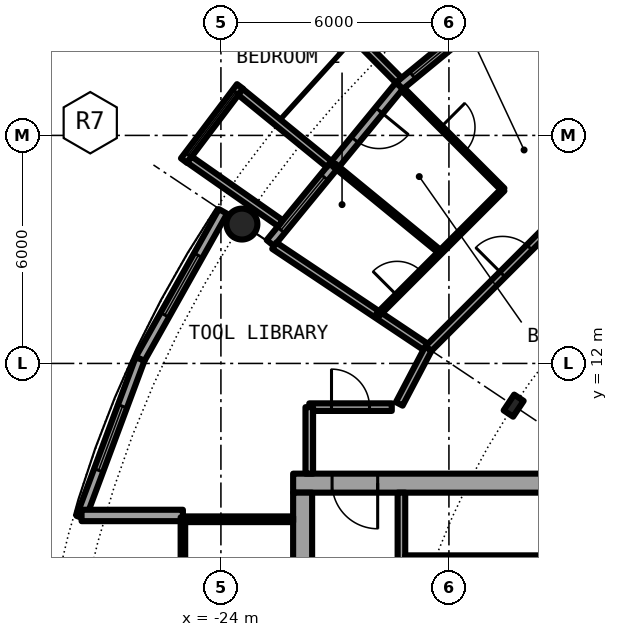
"""IFC4 building model, lengths in metres.
Left out: names, types, materials, properties, quantities, classifications, styles, units other than length and angle.
Written with IfcOpenShell. Run it as: python <this file> out.ifc"""

import sys

from ifc_helpers import new_model, si_unit, direction, frame, frame_2d, origin, origin_2d, place, context, subcontext, project, spatial, rectangle, circle, hollow_circle, i_section, extrude, element, fill, save


model = new_model("IFC4")
c1 = context("Model", 3, precision=1e-05, world=origin(), true_north=direction((0.0, 1.0)))
c2 = subcontext(c1, "Body", "Model", "MODEL_VIEW")
j1 = project(units=[si_unit("LENGTHUNIT", "METRE"), si_unit("PLANEANGLEUNIT", "RADIAN")], contexts=[c1])
p1 = place(None, origin())
s1 = spatial("IfcSite", under=j1, at=p1, CompositionType="ELEMENT")
p2 = place(p1, origin())
s2 = spatial("IfcBuilding", under=s1, at=p2, CompositionType="ELEMENT")
p3 = place(p2, frame((0.0, 0.0, 170.75)))
s3 = spatial("IfcBuildingStorey", under=s2, at=p3, CompositionType="ELEMENT", Elevation=170.75)
p4 = place(p3, frame((-23.448, 15.667, 0.0), z_axis=(0.0, 0.0, 1.0), x_axis=(1.0, 0.0, 0.0)))
e1 = element("IfcColumn", 1, at=p4, inside=s3, PredefinedType="COLUMN", context=c2, shape_type="SweptSolid", body=[
    extrude(hollow_circle(Radius=0.406, WallThickness=0.04, at=origin_2d()), origin(), (0.0, 0.0, 1.0), 3.05),
])
p5 = place(p3, frame((-16.297, 10.889, 0.0), z_axis=(0.0, 0.0, 1.0), x_axis=(-0.831469612303, 0.55557023302, 0.0)))
e2 = element("IfcColumn", 2, at=p5, inside=s3, PredefinedType="COLUMN", context=c2, shape_type="SweptSolid", body=[
    extrude(i_section(OverallWidth=0.3, OverallDepth=0.5, WebThickness=0.014, FlangeThickness=0.028, FilletRadius=0.027, at=origin_2d()), origin(), (0.0, 0.0, 1.0), 3.05),
])
p6 = place(p3, frame((-15.167, 22.699, 0.0), z_axis=(0.0, 0.0, 1.0), x_axis=(-0.773019449054, -0.634382322723, 0.0)))
e3 = element("IfcWall", 3, at=p6, inside=s3, PredefinedType="SOLIDWALL", context=c2, shape_type="SweptSolid", body=[
    extrude(rectangle(XDim=5.352, YDim=0.25, at=frame_2d((2.676, 0.0))), origin(), (0.0, 0.0, 1.0), 2.7),
])
p7 = place(p6, frame((0.841, 0.0, 0.0)))
e4 = element("IfcOpeningElement", 4, at=p7, cuts=e3, PredefinedType="OPENING", context=c2, shape_type="SweptSolid", body=[
    extrude(rectangle(XDim=1.0, YDim=2.2, at=frame_2d((0.5, 1.1))), frame((0.0, 0.135, 0.0), z_axis=(0.0, -1.0, 0.0), x_axis=(1.0, 0.0, 0.0)), (0.0, 0.0, 1.0), 0.27),
])
p8 = place(p6, frame((3.111, 0.0, 0.3)))
e5 = element("IfcOpeningElement", 5, at=p8, cuts=e3, PredefinedType="OPENING", context=c2, shape_type="SweptSolid", body=[
    extrude(rectangle(XDim=1.8, YDim=2.1, at=frame_2d((0.9, 1.05))), frame((0.0, 0.135, 0.0), z_axis=(0.0, -1.0, 0.0), x_axis=(1.0, 0.0, 0.0)), (0.0, 0.0, 1.0), 0.27),
])
p9 = place(p3, frame((-19.323, 19.45, -0.03), z_axis=(0.0, 0.0, 1.0), x_axis=(-0.704476739375, 0.709727076896, 0.0)))
e6 = element("IfcWall", 6, at=p9, inside=s3, PredefinedType="SOLIDWALL", context=c2, shape_type="SweptSolid", body=[
    extrude(rectangle(XDim=2.883, YDim=0.2, at=frame_2d((1.441, 0.0))), origin(), (0.0, 0.0, 1.0), 2.73),
])
p10 = place(p3, frame((-19.304, 19.304, 0.0), z_axis=(0.0, 0.0, 1.0), x_axis=(-0.634382322723, -0.773019449054, 0.0)))
e7 = element("IfcWall", 7, at=p10, inside=s3, PredefinedType="SOLIDWALL", context=c2, shape_type="SweptSolid", body=[
    extrude(rectangle(XDim=5.352, YDim=0.25, at=frame_2d((2.676, 0.0))), origin(), (0.0, 0.0, 1.0), 2.7),
])
p11 = place(p10, frame((0.841, 0.0, 0.0)))
e8 = element("IfcOpeningElement", 8, at=p11, cuts=e7, PredefinedType="OPENING", context=c2, shape_type="SweptSolid", body=[
    extrude(rectangle(XDim=1.0, YDim=2.2, at=frame_2d((0.5, 1.1))), frame((0.0, 0.135, 0.0), z_axis=(0.0, -1.0, 0.0), x_axis=(1.0, 0.0, 0.0)), (0.0, 0.0, 1.0), 0.27),
])
p12 = place(p10, frame((3.111, 0.0, 0.3)))
e9 = element("IfcOpeningElement", 9, at=p12, cuts=e7, PredefinedType="OPENING", context=c2, shape_type="SweptSolid", body=[
    extrude(rectangle(XDim=1.8, YDim=2.1, at=frame_2d((0.9, 1.05))), frame((0.0, 0.135, 0.0), z_axis=(0.0, -1.0, 0.0), x_axis=(1.0, 0.0, 0.0)), (0.0, 0.0, 1.0), 0.27),
])
p13 = place(p3, frame((-23.497, 19.289, -0.03), z_axis=(0.0, 0.0, 1.0), x_axis=(-0.602806268067, -0.797887588059, 0.0)))
e10 = element("IfcWall", 10, at=p13, inside=s3, PredefinedType="SOLIDWALL", context=c2, shape_type="SweptSolid", body=[
    extrude(rectangle(XDim=2.447, YDim=0.2, at=frame_2d((1.223, 0.0))), origin(), (0.0, 0.0, 1.0), 2.73),
])
p14 = place(p13, frame((0.183, 0.0, 0.33)))
e11 = element("IfcOpeningElement", 11, at=p14, cuts=e10, PredefinedType="OPENING", context=c2, shape_type="SweptSolid", body=[
    extrude(circle(Radius=1.04, at=frame_2d((1.04, 1.04))), frame((0.0, 0.11, 0.0), z_axis=(0.0, -1.0, 0.0), x_axis=(1.0, 0.0, 0.0)), (0.0, 0.0, 1.0), 0.22),
])
p15 = place(p3, frame((-21.155, 17.246, -0.03), z_axis=(0.0, 0.0, 1.0), x_axis=(-0.775179004516, 0.631741648902, 0.0)))
e12 = element("IfcWall", 12, at=p15, inside=s3, PredefinedType="SOLIDWALL", context=c2, shape_type="SweptSolid", body=[
    extrude(rectangle(XDim=3.006, YDim=0.2, at=frame_2d((1.503, 0.0))), origin(), (0.0, 0.0, 1.0), 2.73),
])
p16 = place(p3, frame((-22.433, 15.688, -0.03), z_axis=(0.0, 0.0, 1.0), x_axis=(-0.819373043115, 0.573260687834, 0.0)))
e13 = element("IfcWall", 13, at=p16, inside=s3, PredefinedType="SOLIDWALL", context=c2, shape_type="SweptSolid", body=[
    extrude(rectangle(XDim=2.925, YDim=0.2, at=frame_2d((1.463, 0.0))), origin(), (0.0, 0.0, 1.0), 2.73),
])
p17 = place(p3, frame((-23.946, 16.0, 0.0), z_axis=(0.0, 0.0, 1.0), x_axis=(-0.489696356642, -0.871893042919, 0.0)))
e14 = element("IfcWall", 14, at=p17, inside=s3, PredefinedType="SOLIDWALL", context=c2, shape_type="SweptSolid", body=[
    extrude(rectangle(XDim=4.454, YDim=0.25, at=frame_2d((2.227, 0.0))), origin(), (0.0, 0.0, 1.0), 2.7),
])
p18 = place(p17, frame((1.327, 0.0, 0.3)))
e15 = element("IfcOpeningElement", 15, at=p18, cuts=e14, PredefinedType="OPENING", context=c2, shape_type="SweptSolid", body=[
    extrude(rectangle(XDim=1.8, YDim=2.1, at=frame_2d((0.9, 1.05))), frame((0.0, 0.135, 0.0), z_axis=(0.0, -1.0, 0.0), x_axis=(1.0, 0.0, 0.0)), (0.0, 0.0, 1.0), 0.27),
])
p19 = place(p3, frame((-26.127, 12.117, 0.0), z_axis=(0.0, 0.0, 1.0), x_axis=(-0.349247811493, -0.937030397675, 0.0)))
e16 = element("IfcWall", 16, at=p19, inside=s3, PredefinedType="SOLIDWALL", context=c2, shape_type="SweptSolid", body=[
    extrude(rectangle(XDim=4.452, YDim=0.25, at=frame_2d((2.226, 0.0))), origin(), (0.0, 0.0, 1.0), 2.7),
])
p20 = place(p19, frame((1.327, 0.0, 0.3)))
e17 = element("IfcOpeningElement", 17, at=p20, cuts=e16, PredefinedType="OPENING", context=c2, shape_type="SweptSolid", body=[
    extrude(rectangle(XDim=1.8, YDim=2.1, at=frame_2d((0.9, 1.05))), frame((0.0, 0.135, 0.0), z_axis=(0.0, -1.0, 0.0), x_axis=(1.0, 0.0, 0.0)), (0.0, 0.0, 1.0), 0.27),
])
p21 = place(p3, frame((-25.0, 8.0, 0.0), z_axis=(0.0, 0.0, 1.0), x_axis=(-1.0, 0.0, 0.0)))
e18 = element("IfcWall", 18, at=p21, inside=s3, PredefinedType="SOLIDWALL", context=c2, shape_type="SweptSolid", body=[
    extrude(rectangle(XDim=2.667, YDim=0.3, at=frame_2d((1.333, 0.0))), origin(), (0.0, 0.0, 1.0), 2.7),
])
p22 = place(p3, frame((-8.5, 8.85, 0.0), z_axis=(0.0, 0.0, 1.0), x_axis=(-1.0, 0.0, 0.0)))
e19 = element("IfcWall", 19, at=p22, inside=s3, PredefinedType="SHEAR", context=c2, shape_type="SweptSolid", body=[
    extrude(rectangle(XDim=13.6, YDim=0.5, at=frame_2d((6.8, 0.0))), origin(), (0.0, 0.0, 1.0), 3.05),
])
p23 = place(p22, frame((11.375, 0.0, 0.0)))
e20 = element("IfcOpeningElement", 20, at=p23, cuts=e19, PredefinedType="OPENING", context=c2, shape_type="SweptSolid", body=[
    extrude(rectangle(XDim=1.2, YDim=2.3, at=frame_2d((0.6, 1.15))), frame((0.0, 0.26, 0.0), z_axis=(0.0, -1.0, 0.0), x_axis=(1.0, 0.0, 0.0)), (0.0, 0.0, 1.0), 0.52),
])
p24 = place(p3, frame((-21.85, -8.6, 0.0), z_axis=(0.0, 0.0, 1.0), x_axis=(0.0, 1.0, 0.0)))
e21 = element("IfcWall", 21, at=p24, inside=s3, PredefinedType="SHEAR", context=c2, shape_type="SweptSolid", body=[
    extrude(rectangle(XDim=17.2, YDim=0.5, at=frame_2d((8.6, 0.0))), origin(), (0.0, 0.0, 1.0), 3.05),
])
p25 = place(p24, frame((7.7, 0.0, 0.0)))
e22 = element("IfcOpeningElement", 22, at=p25, cuts=e21, PredefinedType="OPENING", context=c2, shape_type="SweptSolid", body=[
    extrude(rectangle(XDim=1.8, YDim=2.3, at=frame_2d((0.9, 1.15))), frame((0.0, 0.26, 0.0), z_axis=(0.0, -1.0, 0.0), x_axis=(1.0, 0.0, 0.0)), (0.0, 0.0, 1.0), 0.52),
])
p26 = place(p3, frame((-19.25, 8.6, 0.0), z_axis=(0.0, 0.0, 1.0), x_axis=(0.0, -1.0, 0.0)))
e23 = element("IfcWall", 23, at=p26, inside=s3, PredefinedType="SOLIDWALL", context=c2, shape_type="SweptSolid", body=[
    extrude(rectangle(XDim=7.025, YDim=0.2, at=frame_2d((3.513, 0.0))), origin(), (0.0, 0.0, 1.0), 2.7),
])
p27 = place(p26, frame((2.35, 0.0, 0.0)))
e24 = element("IfcOpeningElement", 24, at=p27, cuts=e23, PredefinedType="OPENING", context=c2, shape_type="SweptSolid", body=[
    extrude(rectangle(XDim=1.1, YDim=2.3, at=frame_2d((0.55, 1.15))), frame((0.0, 0.11, 0.0), z_axis=(0.0, -1.0, 0.0), x_axis=(1.0, 0.0, 0.0)), (0.0, 0.0, 1.0), 0.22),
])
p28 = place(p3, frame((-15.45, 6.875, 0.0), z_axis=(0.0, 0.0, 1.0), x_axis=(-1.0, 0.0, 0.0)))
e25 = element("IfcWall", 25, at=p28, inside=s3, PredefinedType="PARTITIONING", context=c2, shape_type="SweptSolid", body=[
    extrude(rectangle(XDim=3.7, YDim=0.15, at=frame_2d((1.85, 0.0))), origin(), (0.0, 0.0, 1.0), 2.7),
])
p29 = place(p28, frame((1.4, 0.0, 0.0)))
e26 = element("IfcOpeningElement", 26, at=p29, cuts=e25, PredefinedType="OPENING", context=c2, shape_type="SweptSolid", body=[
    extrude(rectangle(XDim=0.9, YDim=2.3, at=frame_2d((0.45, 1.15))), frame((0.0, 0.085, 0.0), z_axis=(0.0, -1.0, 0.0), x_axis=(1.0, 0.0, 0.0)), (0.0, 0.0, 1.0), 0.17),
])
p30 = place(p3, frame((-22.1, 7.9, 0.0), z_axis=(0.0, 0.0, 1.0), x_axis=(-1.0, 0.0, 0.0)))
e27 = element("IfcWall", 27, at=p30, inside=s3, PredefinedType="PARTITIONING", context=c2, shape_type="SweptSolid", body=[
    extrude(rectangle(XDim=2.84, YDim=0.15, at=frame_2d((1.42, 0.0))), origin(), (0.0, 0.0, 1.0), 2.7),
])
p31 = place(p3, frame((-25.0, 7.95, 0.0), z_axis=(0.0, 0.0, 1.0), x_axis=(0.0, -1.0, 0.0)))
e28 = element("IfcWall", 28, at=p31, inside=s3, PredefinedType="PARTITIONING", context=c2, shape_type="SweptSolid", body=[
    extrude(rectangle(XDim=15.9, YDim=0.12, at=frame_2d((7.95, 0.0))), origin(), (0.0, 0.0, 1.0), 2.7),
])
p32 = place(p31, frame((0.95, 0.0, 0.1)))
e29 = element("IfcOpeningElement", 29, at=p32, cuts=e28, PredefinedType="OPENING", context=c2, shape_type="SweptSolid", body=[
    extrude(rectangle(XDim=14.0, YDim=2.35, at=frame_2d((7.0, 1.175))), frame((0.0, 0.07, 0.0), z_axis=(0.0, -1.0, 0.0), x_axis=(1.0, 0.0, 0.0)), (0.0, 0.0, 1.0), 0.14),
])
p33 = place(p3, frame((-22.595, 15.098, 0.0), z_axis=(0.0, 0.0, 1.0), x_axis=(0.831387096605, -0.55569370664, 0.0)))
e30 = element("IfcWall", 30, at=p33, inside=s3, PredefinedType="PARTITIONING", context=c2, shape_type="SweptSolid", body=[
    extrude(rectangle(XDim=4.875, YDim=0.2, at=frame_2d((2.438, 0.0))), origin(), (0.0, 0.0, 1.0), 2.7),
])
p34 = place(p3, frame((-21.023, 17.22, 0.0), z_axis=(0.0, 0.0, 1.0), x_axis=(0.773548271597, -0.633737383709, 0.0)))
e31 = element("IfcWall", 31, at=p34, inside=s3, PredefinedType="PARTITIONING", context=c2, shape_type="SweptSolid", body=[
    extrude(rectangle(XDim=3.618, YDim=0.1, at=frame_2d((1.809, 0.0))), origin(), (0.0, 0.0, 1.0), 2.7),
])
p35 = place(p3, frame((-19.216, 19.216, 0.0), z_axis=(0.0, 0.0, 1.0), x_axis=(0.707106781187, -0.707106781187, 0.0)))
e32 = element("IfcWall", 32, at=p35, inside=s3, PredefinedType="PARTITIONING", context=c2, shape_type="SweptSolid", body=[
    extrude(rectangle(XDim=3.735, YDim=0.1, at=frame_2d((1.868, 0.0))), origin(), (0.0, 0.0, 1.0), 2.7),
])
p36 = place(p35, frame((1.417, 0.0, 0.0)))
e33 = element("IfcOpeningElement", 33, at=p36, cuts=e32, PredefinedType="OPENING", context=c2, shape_type="SweptSolid", body=[
    extrude(rectangle(XDim=0.9, YDim=2.3, at=frame_2d((0.45, 1.15))), frame((0.0, 0.06, 0.0), z_axis=(0.0, -1.0, 0.0), x_axis=(1.0, 0.0, 0.0)), (0.0, 0.0, 1.0), 0.12),
])
p37 = place(p3, frame((-21.675, 10.85, 0.0), z_axis=(0.0, 0.0, 1.0), x_axis=(1.0, 0.0, 0.0)))
e34 = element("IfcWall", 34, at=p37, inside=s3, PredefinedType="PARTITIONING", context=c2, shape_type="SweptSolid", body=[
    extrude(rectangle(XDim=2.171, YDim=0.2, at=frame_2d((1.085, 0.0))), origin(), (0.0, 0.0, 1.0), 2.7),
])
p38 = place(p37, frame((0.585, 0.0, 0.0)))
e35 = element("IfcOpeningElement", 35, at=p38, cuts=e34, PredefinedType="OPENING", context=c2, shape_type="SweptSolid", body=[
    extrude(rectangle(XDim=1.0, YDim=2.3, at=frame_2d((0.5, 1.15))), frame((0.0, 0.11, 0.0), z_axis=(0.0, -1.0, 0.0), x_axis=(1.0, 0.0, 0.0)), (0.0, 0.0, 1.0), 0.22),
])
p39 = place(p3, frame((-21.675, 9.1, 0.0), z_axis=(0.0, 0.0, 1.0), x_axis=(0.0, 1.0, 0.0)))
e36 = element("IfcWall", 36, at=p39, inside=s3, PredefinedType="PARTITIONING", context=c2, shape_type="SweptSolid", body=[
    extrude(rectangle(XDim=1.75, YDim=0.2, at=frame_2d((0.875, 0.0))), origin(), (0.0, 0.0, 1.0), 2.7),
])
p40 = place(p3, frame((-18.542, 12.389, 0.0), z_axis=(0.0, 0.0, 1.0), x_axis=(0.707106781187, 0.707106781187, 0.0)))
e37 = element("IfcWall", 37, at=p40, inside=s3, PredefinedType="PARTITIONING", context=c2, shape_type="SweptSolid", body=[
    extrude(rectangle(XDim=8.702, YDim=0.2, at=frame_2d((4.351, 0.0))), origin(), (0.0, 0.0, 1.0), 2.7),
])
p41 = place(p40, frame((2.763, 0.0, 0.0)))
e38 = element("IfcOpeningElement", 38, at=p41, cuts=e37, PredefinedType="OPENING", context=c2, shape_type="SweptSolid", body=[
    extrude(rectangle(XDim=1.0, YDim=2.3, at=frame_2d((0.5, 1.15))), frame((0.0, 0.11, 0.0), z_axis=(0.0, -1.0, 0.0), x_axis=(1.0, 0.0, 0.0)), (0.0, 0.0, 1.0), 0.22),
])
p42 = place(p3, frame((-19.307, 10.935, 0.0), z_axis=(0.0, 0.0, 1.0), x_axis=(0.465605550524, 0.884992356646, 0.0)))
e39 = element("IfcWall", 39, at=p42, inside=s3, PredefinedType="PARTITIONING", context=c2, shape_type="SweptSolid", body=[
    extrude(rectangle(XDim=1.643, YDim=0.2, at=frame_2d((0.821, 0.0))), origin(), (0.0, 0.0, 1.0), 2.7),
])
p43 = place(p3, frame((-19.872, 13.278, 0.0), z_axis=(0.0, 0.0, 1.0), x_axis=(0.707132961115, 0.707080600289, 0.0)))
e40 = element("IfcWall", 40, at=p43, inside=s3, PredefinedType="PARTITIONING", context=c2, shape_type="SweptSolid", body=[
    extrude(rectangle(XDim=4.663, YDim=0.1, at=frame_2d((2.331, 0.0))), origin(), (0.0, 0.0, 1.0), 2.7),
])
p44 = place(p43, frame((0.719, 0.0, 0.0)))
e41 = element("IfcOpeningElement", 41, at=p44, cuts=e40, PredefinedType="OPENING", context=c2, shape_type="SweptSolid", body=[
    extrude(rectangle(XDim=0.9, YDim=2.3, at=frame_2d((0.45, 1.15))), frame((0.0, 0.06, 0.0), z_axis=(0.0, -1.0, 0.0), x_axis=(1.0, 0.0, 0.0)), (0.0, 0.0, 1.0), 0.12),
])
p45 = place(p8, origin())
e42 = element("IfcWindow", 42, at=p45, inside=s3, PartitioningType="SINGLE_PANEL", PredefinedType="WINDOW", context=c2, shape_type="SweptSolid", body=[
    extrude(rectangle(XDim=1.8, YDim=2.1, at=frame_2d((0.9, 1.05))), frame((0.0, 0.03, 0.0), z_axis=(0.0, -1.0, 0.0), x_axis=(1.0, 0.0, 0.0)), (0.0, 0.0, 1.0), 0.06),
])
fill(e5, e42)
p46 = place(p11, origin())
e43 = element("IfcDoor", 43, at=p46, inside=s3, OperationType="SINGLE_SWING_LEFT", PredefinedType="DOOR", context=c2, shape_type="SweptSolid", body=[
    extrude(rectangle(XDim=1.0, YDim=2.2, at=frame_2d((0.5, 1.1))), frame((0.0, 0.025, 0.0), z_axis=(0.0, -1.0, 0.0), x_axis=(1.0, 0.0, 0.0)), (0.0, 0.0, 1.0), 0.05),
])
fill(e8, e43)
p47 = place(p12, origin())
e44 = element("IfcWindow", 44, at=p47, inside=s3, PartitioningType="SINGLE_PANEL", PredefinedType="WINDOW", context=c2, shape_type="SweptSolid", body=[
    extrude(rectangle(XDim=1.8, YDim=2.1, at=frame_2d((0.9, 1.05))), frame((0.0, 0.03, 0.0), z_axis=(0.0, -1.0, 0.0), x_axis=(1.0, 0.0, 0.0)), (0.0, 0.0, 1.0), 0.06),
])
fill(e9, e44)
p48 = place(p14, origin())
e45 = element("IfcWindow", 45, at=p48, inside=s3, PartitioningType="SINGLE_PANEL", PredefinedType="WINDOW", context=c2, shape_type="SweptSolid", body=[
    extrude(circle(Radius=1.04, at=frame_2d((1.04, 1.04))), frame((0.0, 0.03, 0.0), z_axis=(0.0, -1.0, 0.0), x_axis=(1.0, 0.0, 0.0)), (0.0, 0.0, 1.0), 0.06),
])
fill(e11, e45)
p49 = place(p18, origin())
e46 = element("IfcWindow", 46, at=p49, inside=s3, PartitioningType="SINGLE_PANEL", PredefinedType="WINDOW", context=c2, shape_type="SweptSolid", body=[
    extrude(rectangle(XDim=1.8, YDim=2.1, at=frame_2d((0.9, 1.05))), frame((0.0, 0.03, 0.0), z_axis=(0.0, -1.0, 0.0), x_axis=(1.0, 0.0, 0.0)), (0.0, 0.0, 1.0), 0.06),
])
fill(e15, e46)
p50 = place(p20, origin())
e47 = element("IfcWindow", 47, at=p50, inside=s3, PartitioningType="SINGLE_PANEL", PredefinedType="WINDOW", context=c2, shape_type="SweptSolid", body=[
    extrude(rectangle(XDim=1.8, YDim=2.1, at=frame_2d((0.9, 1.05))), frame((0.0, 0.03, 0.0), z_axis=(0.0, -1.0, 0.0), x_axis=(1.0, 0.0, 0.0)), (0.0, 0.0, 1.0), 0.06),
])
fill(e17, e47)
p51 = place(p29, origin())
e48 = element("IfcDoor", 48, at=p51, inside=s3, OperationType="SINGLE_SWING_LEFT", PredefinedType="DOOR", context=c2, shape_type="SweptSolid", body=[
    extrude(rectangle(XDim=0.9, YDim=2.3, at=frame_2d((0.45, 1.15))), frame((0.0, 0.025, 0.0), z_axis=(0.0, -1.0, 0.0), x_axis=(1.0, 0.0, 0.0)), (0.0, 0.0, 1.0), 0.05),
])
fill(e26, e48)
p52 = place(p23, origin())
e49 = element("IfcDoor", 49, at=p52, inside=s3, OperationType="SINGLE_SWING_LEFT", PredefinedType="DOOR", context=c2, shape_type="SweptSolid", body=[
    extrude(rectangle(XDim=1.2, YDim=2.3, at=frame_2d((0.6, 1.15))), frame((0.0, 0.025, 0.0), z_axis=(0.0, -1.0, 0.0), x_axis=(1.0, 0.0, 0.0)), (0.0, 0.0, 1.0), 0.05),
])
fill(e20, e49)
p53 = place(p32, origin())
e50 = element("IfcWindow", 50, at=p53, inside=s3, PartitioningType="SINGLE_PANEL", PredefinedType="WINDOW", context=c2, shape_type="SweptSolid", body=[
    extrude(rectangle(XDim=14.0, YDim=2.35, at=frame_2d((7.0, 1.175))), frame((0.0, 0.03, 0.0), z_axis=(0.0, -1.0, 0.0), x_axis=(1.0, 0.0, 0.0)), (0.0, 0.0, 1.0), 0.06),
])
fill(e29, e50)
p54 = place(p41, origin())
e51 = element("IfcDoor", 51, at=p54, inside=s3, OperationType="SINGLE_SWING_LEFT", PredefinedType="DOOR", context=c2, shape_type="SweptSolid", body=[
    extrude(rectangle(XDim=1.0, YDim=2.3, at=frame_2d((0.5, 1.15))), frame((0.0, 0.025, 0.0), z_axis=(0.0, -1.0, 0.0), x_axis=(1.0, 0.0, 0.0)), (0.0, 0.0, 1.0), 0.05),
])
fill(e38, e51)
p55 = place(p36, origin())
e52 = element("IfcDoor", 52, at=p55, inside=s3, OperationType="SINGLE_SWING_LEFT", PredefinedType="DOOR", context=c2, shape_type="SweptSolid", body=[
    extrude(rectangle(XDim=0.9, YDim=2.3, at=frame_2d((0.45, 1.15))), frame((0.0, 0.025, 0.0), z_axis=(0.0, -1.0, 0.0), x_axis=(1.0, 0.0, 0.0)), (0.0, 0.0, 1.0), 0.05),
])
fill(e33, e52)
p56 = place(p44, origin())
e53 = element("IfcDoor", 53, at=p56, inside=s3, OperationType="SINGLE_SWING_LEFT", PredefinedType="DOOR", context=c2, shape_type="SweptSolid", body=[
    extrude(rectangle(XDim=0.9, YDim=2.3, at=frame_2d((0.45, 1.15))), frame((0.0, 0.025, 0.0), z_axis=(0.0, -1.0, 0.0), x_axis=(1.0, 0.0, 0.0)), (0.0, 0.0, 1.0), 0.05),
])
fill(e41, e53)
p57 = place(p38, origin())
e54 = element("IfcDoor", 54, at=p57, inside=s3, OperationType="SINGLE_SWING_LEFT", PredefinedType="DOOR", context=c2, shape_type="SweptSolid", body=[
    extrude(rectangle(XDim=1.0, YDim=2.3, at=frame_2d((0.5, 1.15))), frame((0.0, 0.025, 0.0), z_axis=(0.0, -1.0, 0.0), x_axis=(1.0, 0.0, 0.0)), (0.0, 0.0, 1.0), 0.05),
])
fill(e35, e54)
save(model, sys.argv[1])
